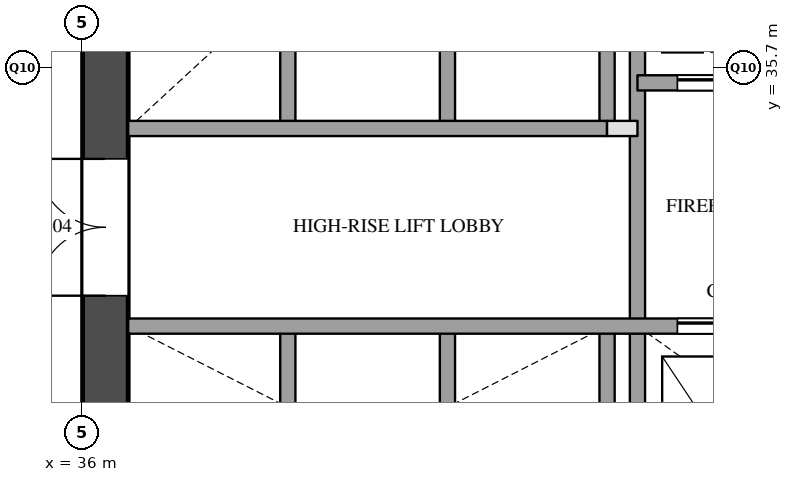
"""IFC4 building model, lengths in metres.
Left out: names, types, materials, properties, quantities, classifications, styles, units other than length and angle.
Written with IfcOpenShell. Run it as: python <this file> out.ifc"""

import sys

from ifc_helpers import new_model, si_unit, direction, frame, frame_2d, origin, place, context, subcontext, project, spatial, rectangle, extrude, element, fill, save


model = new_model("IFC4")
c1 = context("Model", 3, precision=1e-05, world=origin(), true_north=direction((0.0, 1.0)))
c2 = subcontext(c1, "Body", "Model", "MODEL_VIEW")
j1 = project(units=[si_unit("LENGTHUNIT", "METRE"), si_unit("PLANEANGLEUNIT", "RADIAN")], contexts=[c1])
p1 = place(None, origin())
s1 = spatial("IfcSite", under=j1, at=p1, CompositionType="ELEMENT")
p2 = place(p1, origin())
s2 = spatial("IfcBuilding", under=s1, at=p2, CompositionType="ELEMENT")
p3 = place(p2, frame((0.0, 0.0, 77.8)))
s3 = spatial("IfcBuildingStorey", under=s2, at=p3, CompositionType="ELEMENT", Elevation=77.8)
p4 = place(p3, frame((36.3, 29.1, 0.0), z_axis=(0.0, 0.0, 1.0), x_axis=(0.0, 1.0, 0.0)))
e1 = element("IfcWall", 1, at=p4, inside=s3, PredefinedType="SHEAR", context=c2, shape_type="SweptSolid", body=[
    extrude(rectangle(XDim=20.3, YDim=0.6, at=frame_2d((10.15, 0.0))), origin(), (0.0, 0.0, 1.0), 3.5),
])
p5 = place(p4, frame((3.6, 0.0, 0.0)))
e2 = element("IfcOpeningElement", 2, at=p5, cuts=e1, PredefinedType="OPENING", context=c2, shape_type="SweptSolid", body=[
    extrude(rectangle(XDim=1.8, YDim=2.1, at=frame_2d((0.9, 1.05))), frame((0.0, 0.31, 0.0), z_axis=(0.0, -1.0, 0.0), x_axis=(1.0, 0.0, 0.0)), (0.0, 0.0, 1.0), 0.62),
])
p6 = place(p4, frame((16.4, 0.0, 0.0)))
e3 = element("IfcOpeningElement", 3, at=p6, cuts=e1, PredefinedType="OPENING", context=c2, shape_type="SweptSolid", body=[
    extrude(rectangle(XDim=1.0, YDim=2.1, at=frame_2d((0.5, 1.05))), frame((0.0, 0.31, 0.0), z_axis=(0.0, -1.0, 0.0), x_axis=(1.0, 0.0, 0.0)), (0.0, 0.0, 1.0), 0.62),
])
p7 = place(p3, frame((38.7, 29.1, 0.0), z_axis=(0.0, 0.0, 1.0), x_axis=(0.0, 1.0, 0.0)))
e4 = element("IfcWall", 4, at=p7, inside=s3, PredefinedType="SOLIDWALL", context=c2, shape_type="SweptSolid", body=[
    extrude(rectangle(XDim=3.2, YDim=0.2, at=frame_2d((1.6, 0.0))), origin(), (0.0, 0.0, 1.0), 3.5),
])
p8 = place(p3, frame((38.7, 34.9, 0.0), z_axis=(0.0, 0.0, 1.0), x_axis=(0.0, 1.0, 0.0)))
e5 = element("IfcWall", 5, at=p8, inside=s3, PredefinedType="SOLIDWALL", context=c2, shape_type="SweptSolid", body=[
    extrude(rectangle(XDim=3.2, YDim=0.2, at=frame_2d((1.6, 0.0))), origin(), (0.0, 0.0, 1.0), 3.5),
])
p9 = place(p3, frame((40.8, 29.1, 0.0), z_axis=(0.0, 0.0, 1.0), x_axis=(0.0, 1.0, 0.0)))
e6 = element("IfcWall", 6, at=p9, inside=s3, PredefinedType="SOLIDWALL", context=c2, shape_type="SweptSolid", body=[
    extrude(rectangle(XDim=3.2, YDim=0.2, at=frame_2d((1.6, 0.0))), origin(), (0.0, 0.0, 1.0), 3.5),
])
p10 = place(p3, frame((40.8, 34.9, 0.0), z_axis=(0.0, 0.0, 1.0), x_axis=(0.0, 1.0, 0.0)))
e7 = element("IfcWall", 7, at=p10, inside=s3, PredefinedType="SOLIDWALL", context=c2, shape_type="SweptSolid", body=[
    extrude(rectangle(XDim=3.2, YDim=0.2, at=frame_2d((1.6, 0.0))), origin(), (0.0, 0.0, 1.0), 3.5),
])
p11 = place(p3, frame((42.9, 29.1, 0.0), z_axis=(0.0, 0.0, 1.0), x_axis=(0.0, 1.0, 0.0)))
e8 = element("IfcWall", 8, at=p11, inside=s3, PredefinedType="SOLIDWALL", context=c2, shape_type="SweptSolid", body=[
    extrude(rectangle(XDim=3.2, YDim=0.2, at=frame_2d((1.6, 0.0))), origin(), (0.0, 0.0, 1.0), 3.5),
])
p12 = place(p3, frame((42.9, 34.9, 0.0), z_axis=(0.0, 0.0, 1.0), x_axis=(0.0, 1.0, 0.0)))
e9 = element("IfcWall", 9, at=p12, inside=s3, PredefinedType="SOLIDWALL", context=c2, shape_type="SweptSolid", body=[
    extrude(rectangle(XDim=3.2, YDim=0.2, at=frame_2d((1.6, 0.0))), origin(), (0.0, 0.0, 1.0), 3.5),
])
p13 = place(p3, frame((43.3, 29.1, 0.0), z_axis=(0.0, 0.0, 1.0), x_axis=(0.0, 1.0, 0.0)))
e10 = element("IfcWall", 10, at=p13, inside=s3, PredefinedType="SOLIDWALL", context=c2, shape_type="SweptSolid", body=[
    extrude(rectangle(XDim=9.9, YDim=0.2, at=frame_2d((4.95, 0.0))), origin(), (0.0, 0.0, 1.0), 3.5),
])
p14 = place(p3, frame((36.6, 32.3, 0.0), z_axis=(0.0, 0.0, 1.0), x_axis=(1.0, 0.0, 0.0)))
e11 = element("IfcWall", 11, at=p14, inside=s3, PredefinedType="SOLIDWALL", context=c2, shape_type="SweptSolid", body=[
    extrude(rectangle(XDim=11.2, YDim=0.2, at=frame_2d((5.6, 0.0))), origin(), (0.0, 0.0, 1.0), 3.5),
])
p15 = place(p14, frame((7.225, 0.0, 0.0)))
e12 = element("IfcOpeningElement", 12, at=p15, cuts=e11, PredefinedType="OPENING", context=c2, shape_type="SweptSolid", body=[
    extrude(rectangle(XDim=1.2, YDim=2.1, at=frame_2d((0.6, 1.05))), frame((0.0, 0.11, 0.0), z_axis=(0.0, -1.0, 0.0), x_axis=(1.0, 0.0, 0.0)), (0.0, 0.0, 1.0), 0.22),
])
p16 = place(p14, frame((9.475, 0.0, 0.0)))
e13 = element("IfcOpeningElement", 13, at=p16, cuts=e11, PredefinedType="OPENING", context=c2, shape_type="SweptSolid", body=[
    extrude(rectangle(XDim=1.2, YDim=2.1, at=frame_2d((0.6, 1.05))), frame((0.0, 0.11, 0.0), z_axis=(0.0, -1.0, 0.0), x_axis=(1.0, 0.0, 0.0)), (0.0, 0.0, 1.0), 0.22),
])
p17 = place(p3, frame((42.9, 34.9, 0.0), z_axis=(0.0, 0.0, 1.0), x_axis=(1.0, 0.0, 0.0)))
e14 = element("IfcWall", 14, at=p17, inside=s3, PredefinedType="PARTITIONING", context=c2, shape_type="SweptSolid", body=[
    extrude(rectangle(XDim=0.4, YDim=0.2, at=frame_2d((0.2, 0.0))), origin(), (0.0, 0.0, 1.0), 3.5),
])
p18 = place(p3, frame((36.6, 34.9, 0.0), z_axis=(0.0, 0.0, 1.0), x_axis=(1.0, 0.0, 0.0)))
e15 = element("IfcWall", 15, at=p18, inside=s3, PredefinedType="SOLIDWALL", context=c2, shape_type="SweptSolid", body=[
    extrude(rectangle(XDim=6.3, YDim=0.2, at=frame_2d((3.15, 0.0))), origin(), (0.0, 0.0, 1.0), 3.5),
])
p19 = place(p3, frame((43.3, 35.5, 0.0), z_axis=(0.0, 0.0, 1.0), x_axis=(1.0, 0.0, 0.0)))
e16 = element("IfcWall", 16, at=p19, inside=s3, PredefinedType="SOLIDWALL", context=c2, shape_type="SweptSolid", body=[
    extrude(rectangle(XDim=4.5, YDim=0.2, at=frame_2d((2.25, 0.0))), origin(), (0.0, 0.0, 1.0), 3.5),
])
p20 = place(p19, frame((0.525, 0.0, 0.0)))
e17 = element("IfcOpeningElement", 17, at=p20, cuts=e16, PredefinedType="OPENING", context=c2, shape_type="SweptSolid", body=[
    extrude(rectangle(XDim=1.2, YDim=2.1, at=frame_2d((0.6, 1.05))), frame((0.0, 0.11, 0.0), z_axis=(0.0, -1.0, 0.0), x_axis=(1.0, 0.0, 0.0)), (0.0, 0.0, 1.0), 0.22),
])
p21 = place(p19, frame((3.025, 0.0, 0.0)))
e18 = element("IfcOpeningElement", 18, at=p21, cuts=e16, PredefinedType="OPENING", context=c2, shape_type="SweptSolid", body=[
    extrude(rectangle(XDim=0.7, YDim=2.1, at=frame_2d((0.35, 1.05))), frame((0.0, 0.11, 0.0), z_axis=(0.0, -1.0, 0.0), x_axis=(1.0, 0.0, 0.0)), (0.0, 0.0, 1.0), 0.22),
])
p22 = place(p15, origin())
e19 = element("IfcDoor", 19, at=p22, inside=s3, OperationType="SLIDING_TO_LEFT", PredefinedType="DOOR", context=c2, shape_type="SweptSolid", body=[
    extrude(rectangle(XDim=1.2, YDim=2.1, at=frame_2d((0.6, 1.05))), frame((0.0, 0.025, 0.0), z_axis=(0.0, -1.0, 0.0), x_axis=(1.0, 0.0, 0.0)), (0.0, 0.0, 1.0), 0.05),
])
fill(e12, e19)
p23 = place(p20, origin())
e20 = element("IfcDoor", 20, at=p23, inside=s3, OperationType="SLIDING_TO_LEFT", PredefinedType="DOOR", context=c2, shape_type="SweptSolid", body=[
    extrude(rectangle(XDim=1.2, YDim=2.1, at=frame_2d((0.6, 1.05))), frame((0.0, 0.025, 0.0), z_axis=(0.0, -1.0, 0.0), x_axis=(1.0, 0.0, 0.0)), (0.0, 0.0, 1.0), 0.05),
])
fill(e17, e20)
p24 = place(p5, origin())
e21 = element("IfcDoor", 21, at=p24, inside=s3, OperationType="DOUBLE_DOOR_SINGLE_SWING", PredefinedType="DOOR", context=c2, shape_type="SweptSolid", body=[
    extrude(rectangle(XDim=1.8, YDim=2.1, at=frame_2d((0.9, 1.05))), frame((0.0, 0.025, 0.0), z_axis=(0.0, -1.0, 0.0), x_axis=(1.0, 0.0, 0.0)), (0.0, 0.0, 1.0), 0.05),
])
fill(e2, e21)
save(model, sys.argv[1])
